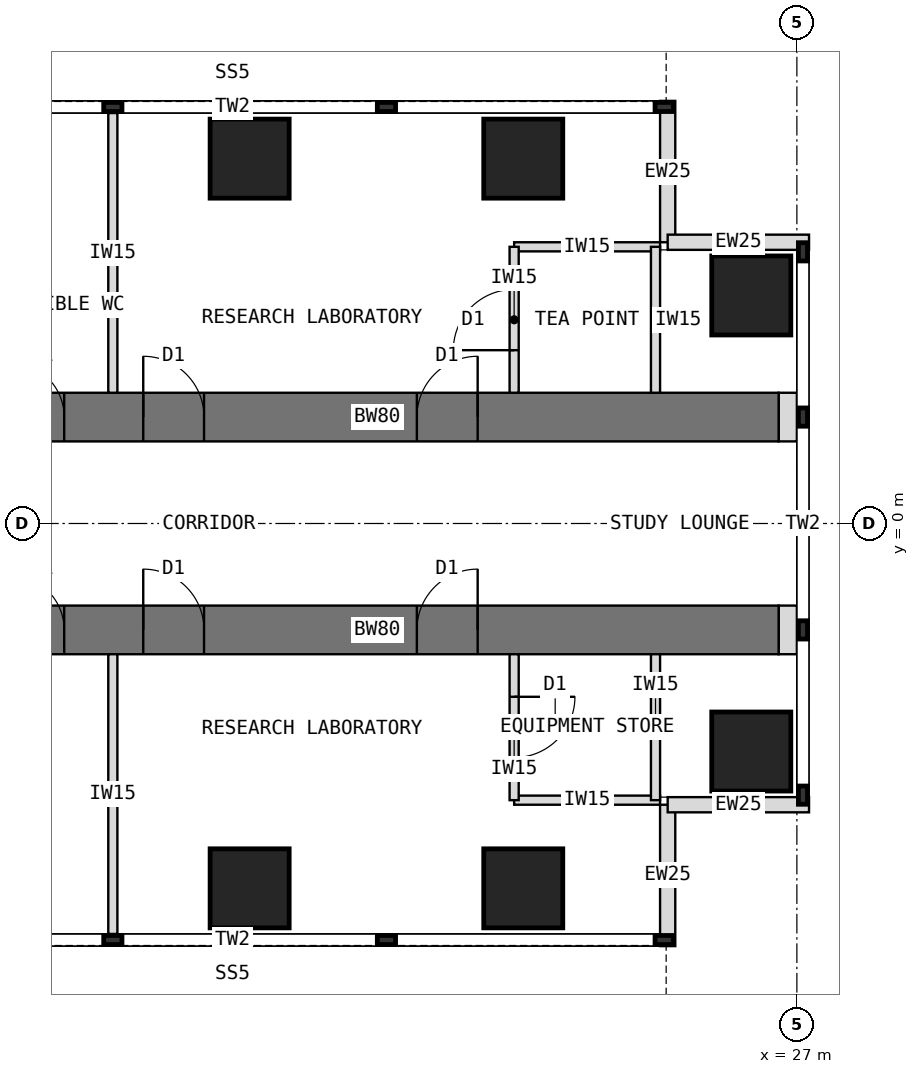
"""IFC4 building model, lengths in metres.
Left out: names, types, materials, properties, quantities, classifications, styles, units other than length and angle.
Written with IfcOpenShell. Run it as: python <this file> out.ifc"""

import sys

from ifc_helpers import new_model, si_unit, direction, frame, frame_2d, origin, origin_2d, place, context, subcontext, project, spatial, rectangle, extrude, element, fill, save


model = new_model("IFC4")
c1 = context("Model", 3, precision=1e-05, world=origin(), true_north=direction((0.0, 1.0)))
c2 = subcontext(c1, "Body", "Model", "MODEL_VIEW")
j1 = project(units=[si_unit("LENGTHUNIT", "METRE"), si_unit("PLANEANGLEUNIT", "RADIAN")], contexts=[c1])
p1 = place(None, origin())
s1 = spatial("IfcSite", under=j1, at=p1, CompositionType="ELEMENT")
p2 = place(p1, origin())
s2 = spatial("IfcBuilding", under=s1, at=p2, CompositionType="ELEMENT")
p3 = place(p2, frame((0.0, 0.0, 125.5)))
s3 = spatial("IfcBuildingStorey", under=s2, at=p3, CompositionType="ELEMENT", Elevation=125.5)
p4 = place(p3, frame((13.5, 1.75, 0.0), z_axis=(0.0, 0.0, 1.0), x_axis=(1.0, 0.0, 0.0)))
e1 = element("IfcWall", 1, at=p4, inside=s3, PredefinedType="SHEAR", context=c2, shape_type="SweptSolid", body=[
    extrude(rectangle(XDim=13.2, YDim=0.8, at=frame_2d((6.6, 0.0))), origin(), (0.0, 0.0, 1.0), 4.0),
])
p5 = place(p4, frame((0.55, 0.0, 0.0)))
e2 = element("IfcOpeningElement", 2, at=p5, cuts=e1, PredefinedType="OPENING", context=c2, shape_type="SweptSolid", body=[
    extrude(rectangle(XDim=0.9, YDim=2.1, at=frame_2d((0.45, 1.05))), frame((0.0, 0.41, 0.0), z_axis=(0.0, -1.0, 0.0), x_axis=(1.0, 0.0, 0.0)), (0.0, 0.0, 1.0), 0.82),
])
p6 = place(p4, frame((2.75, 0.0, 0.0)))
e3 = element("IfcOpeningElement", 3, at=p6, cuts=e1, PredefinedType="OPENING", context=c2, shape_type="SweptSolid", body=[
    extrude(rectangle(XDim=1.0, YDim=2.1, at=frame_2d((0.5, 1.05))), frame((0.0, 0.41, 0.0), z_axis=(0.0, -1.0, 0.0), x_axis=(1.0, 0.0, 0.0)), (0.0, 0.0, 1.0), 0.82),
])
p7 = place(p4, frame((7.25, 0.0, 0.0)))
e4 = element("IfcOpeningElement", 4, at=p7, cuts=e1, PredefinedType="OPENING", context=c2, shape_type="SweptSolid", body=[
    extrude(rectangle(XDim=1.0, YDim=2.1, at=frame_2d((0.5, 1.05))), frame((0.0, 0.41, 0.0), z_axis=(0.0, -1.0, 0.0), x_axis=(1.0, 0.0, 0.0)), (0.0, 0.0, 1.0), 0.82),
])
p8 = place(p3, frame((13.5, -1.75, 0.0), z_axis=(0.0, 0.0, 1.0), x_axis=(1.0, 0.0, 0.0)))
e5 = element("IfcWall", 5, at=p8, inside=s3, PredefinedType="SHEAR", context=c2, shape_type="SweptSolid", body=[
    extrude(rectangle(XDim=13.2, YDim=0.8, at=frame_2d((6.6, 0.0))), origin(), (0.0, 0.0, 1.0), 4.0),
])
p9 = place(p8, frame((0.55, 0.0, 0.0)))
e6 = element("IfcOpeningElement", 6, at=p9, cuts=e5, PredefinedType="OPENING", context=c2, shape_type="SweptSolid", body=[
    extrude(rectangle(XDim=0.9, YDim=2.1, at=frame_2d((0.45, 1.05))), frame((0.0, 0.41, 0.0), z_axis=(0.0, -1.0, 0.0), x_axis=(1.0, 0.0, 0.0)), (0.0, 0.0, 1.0), 0.82),
])
p10 = place(p8, frame((2.75, 0.0, 0.0)))
e7 = element("IfcOpeningElement", 7, at=p10, cuts=e5, PredefinedType="OPENING", context=c2, shape_type="SweptSolid", body=[
    extrude(rectangle(XDim=1.0, YDim=2.1, at=frame_2d((0.5, 1.05))), frame((0.0, 0.41, 0.0), z_axis=(0.0, -1.0, 0.0), x_axis=(1.0, 0.0, 0.0)), (0.0, 0.0, 1.0), 0.82),
])
p11 = place(p8, frame((7.25, 0.0, 0.0)))
e8 = element("IfcOpeningElement", 8, at=p11, cuts=e5, PredefinedType="OPENING", context=c2, shape_type="SweptSolid", body=[
    extrude(rectangle(XDim=1.0, YDim=2.1, at=frame_2d((0.5, 1.05))), frame((0.0, 0.41, 0.0), z_axis=(0.0, -1.0, 0.0), x_axis=(1.0, 0.0, 0.0)), (0.0, 0.0, 1.0), 0.82),
])
for number, where, z_axis, x_axis in (
    (9, (18.0, 6.0, 0.0), (0.0, 0.0, 1.0), (1.0, 0.0, 0.0)),
    (10, (18.0, -6.0, 0.0), (0.0, 0.0, 1.0), (1.0, 0.0, 0.0)),
    (11, (22.5, 6.0, 0.0), (0.0, 0.0, 1.0), (1.0, 0.0, 0.0)),
    (12, (22.5, -6.0, 0.0), (0.0, 0.0, 1.0), (1.0, 0.0, 0.0)),
    (13, (26.25, 3.75, 0.0), (0.0, 0.0, 1.0), (1.0, 0.0, 0.0)),
    (14, (26.25, -3.75, 0.0), (0.0, 0.0, 1.0), (1.0, 0.0, 0.0)),
):
    element("IfcColumn", number, at=place(p3, frame(where, z_axis=z_axis, x_axis=x_axis)), inside=s3, PredefinedType="COLUMN", context=c2, shape_type="SweptSolid", body=[
        extrude(rectangle(XDim=1.3, YDim=1.3, at=origin_2d()), origin(), (0.0, 0.0, 1.0), 4.0),
    ])
for number, where, z_axis, x_axis in (
    (15, (24.875, 6.95, 0.0), (0.0, 0.0, 1.0), (0.0, -1.0, 0.0)),
    (16, (24.875, 4.625, 0.0), (0.0, 0.0, 1.0), (1.0, 0.0, 0.0)),
    (17, (24.875, -6.95, 0.0), (0.0, 0.0, 1.0), (0.0, 1.0, 0.0)),
    (18, (24.875, -4.625, 0.0), (0.0, 0.0, 1.0), (1.0, 0.0, 0.0)),
):
    element("IfcWall", number, at=place(p3, frame(where, z_axis=z_axis, x_axis=x_axis)), inside=s3, PredefinedType="STANDARD", context=c2, shape_type="SweptSolid", body=[
        extrude(rectangle(XDim=2.325, YDim=0.25, at=frame_2d((1.163, 0.0))), origin(), (0.0, 0.0, 1.0), 3.8),
    ])
for number, where, z_axis, x_axis in (
    (19, (26.7, 1.75, 0.0), (0.0, 0.0, 1.0), (1.0, 0.0, 0.0)),
    (20, (26.7, -1.75, 0.0), (0.0, 0.0, 1.0), (1.0, 0.0, 0.0)),
):
    element("IfcWall", number, at=place(p3, frame(where, z_axis=z_axis, x_axis=x_axis)), inside=s3, PredefinedType="PARTITIONING", context=c2, shape_type="SweptSolid", body=[
        extrude(rectangle(XDim=0.3, YDim=0.8, at=frame_2d((0.15, 0.0))), origin(), (0.0, 0.0, 1.0), 3.8),
    ])
p12 = place(p3, frame((15.75, 2.15, 0.0), z_axis=(0.0, 0.0, 1.0), x_axis=(0.0, 1.0, 0.0)))
e21 = element("IfcWall", 21, at=p12, inside=s3, PredefinedType="PARTITIONING", context=c2, shape_type="SweptSolid", body=[
    extrude(rectangle(XDim=4.6, YDim=0.15, at=frame_2d((2.3, 0.0))), origin(), (0.0, 0.0, 1.0), 3.8),
])
p13 = place(p3, frame((22.35, 4.55, 0.0), z_axis=(0.0, 0.0, 1.0), x_axis=(1.0, 0.0, 0.0)))
e22 = element("IfcWall", 22, at=p13, inside=s3, PredefinedType="PARTITIONING", context=c2, shape_type="SweptSolid", body=[
    extrude(rectangle(XDim=2.4, YDim=0.15, at=frame_2d((1.2, 0.0))), origin(), (0.0, 0.0, 1.0), 3.8),
])
p14 = place(p3, frame((22.35, 2.15, 0.0), z_axis=(0.0, 0.0, 1.0), x_axis=(0.0, 1.0, 0.0)))
e23 = element("IfcWall", 23, at=p14, inside=s3, PredefinedType="PARTITIONING", context=c2, shape_type="SweptSolid", body=[
    extrude(rectangle(XDim=2.4, YDim=0.15, at=frame_2d((1.2, 0.0))), origin(), (0.0, 0.0, 1.0), 3.8),
])
p15 = place(p14, frame((0.7, 0.0, 0.0)))
e24 = element("IfcOpeningElement", 24, at=p15, cuts=e23, PredefinedType="OPENING", context=c2, shape_type="SweptSolid", body=[
    extrude(rectangle(XDim=1.0, YDim=2.1, at=frame_2d((0.5, 1.05))), frame((0.0, 0.085, 0.0), z_axis=(0.0, -1.0, 0.0), x_axis=(1.0, 0.0, 0.0)), (0.0, 0.0, 1.0), 0.17),
])
p16 = place(p3, frame((24.675, 2.15, 0.0), z_axis=(0.0, 0.0, 1.0), x_axis=(0.0, 1.0, 0.0)))
e25 = element("IfcWall", 25, at=p16, inside=s3, PredefinedType="PARTITIONING", context=c2, shape_type="SweptSolid", body=[
    extrude(rectangle(XDim=2.4, YDim=0.15, at=frame_2d((1.2, 0.0))), origin(), (0.0, 0.0, 1.0), 3.8),
])
p17 = place(p3, frame((15.75, -2.15, 0.0), z_axis=(0.0, 0.0, 1.0), x_axis=(0.0, -1.0, 0.0)))
e26 = element("IfcWall", 26, at=p17, inside=s3, PredefinedType="PARTITIONING", context=c2, shape_type="SweptSolid", body=[
    extrude(rectangle(XDim=4.6, YDim=0.15, at=frame_2d((2.3, 0.0))), origin(), (0.0, 0.0, 1.0), 3.8),
])
p18 = place(p3, frame((22.35, -4.55, 0.0), z_axis=(0.0, 0.0, 1.0), x_axis=(1.0, 0.0, 0.0)))
e27 = element("IfcWall", 27, at=p18, inside=s3, PredefinedType="PARTITIONING", context=c2, shape_type="SweptSolid", body=[
    extrude(rectangle(XDim=2.4, YDim=0.15, at=frame_2d((1.2, 0.0))), origin(), (0.0, 0.0, 1.0), 3.8),
])
p19 = place(p3, frame((22.35, -2.15, 0.0), z_axis=(0.0, 0.0, 1.0), x_axis=(0.0, -1.0, 0.0)))
e28 = element("IfcWall", 28, at=p19, inside=s3, PredefinedType="PARTITIONING", context=c2, shape_type="SweptSolid", body=[
    extrude(rectangle(XDim=2.4, YDim=0.15, at=frame_2d((1.2, 0.0))), origin(), (0.0, 0.0, 1.0), 3.8),
])
p20 = place(p19, frame((0.7, 0.0, 0.0)))
e29 = element("IfcOpeningElement", 29, at=p20, cuts=e28, PredefinedType="OPENING", context=c2, shape_type="SweptSolid", body=[
    extrude(rectangle(XDim=1.0, YDim=2.1, at=frame_2d((0.5, 1.05))), frame((0.0, 0.085, 0.0), z_axis=(0.0, -1.0, 0.0), x_axis=(1.0, 0.0, 0.0)), (0.0, 0.0, 1.0), 0.17),
])
p21 = place(p3, frame((24.675, -2.15, 0.0), z_axis=(0.0, 0.0, 1.0), x_axis=(0.0, -1.0, 0.0)))
e30 = element("IfcWall", 30, at=p21, inside=s3, PredefinedType="PARTITIONING", context=c2, shape_type="SweptSolid", body=[
    extrude(rectangle(XDim=2.4, YDim=0.15, at=frame_2d((1.2, 0.0))), origin(), (0.0, 0.0, 1.0), 3.8),
])
p22 = place(p15, origin())
e31 = element("IfcDoor", 31, at=p22, inside=s3, OperationType="SINGLE_SWING_LEFT", PredefinedType="DOOR", context=c2, shape_type="SweptSolid", body=[
    extrude(rectangle(XDim=1.0, YDim=2.1, at=frame_2d((0.5, 1.05))), frame((0.0, 0.025, 0.0), z_axis=(0.0, -1.0, 0.0), x_axis=(1.0, 0.0, 0.0)), (0.0, 0.0, 1.0), 0.05),
])
fill(e24, e31)
p23 = place(p20, origin())
e32 = element("IfcDoor", 32, at=p23, inside=s3, OperationType="SINGLE_SWING_LEFT", PredefinedType="DOOR", context=c2, shape_type="SweptSolid", body=[
    extrude(rectangle(XDim=1.0, YDim=2.1, at=frame_2d((0.5, 1.05))), frame((0.0, 0.025, 0.0), z_axis=(0.0, -1.0, 0.0), x_axis=(1.0, 0.0, 0.0)), (0.0, 0.0, 1.0), 0.05),
])
fill(e29, e32)
p24 = place(p5, origin())
e33 = element("IfcDoor", 33, at=p24, inside=s3, OperationType="SINGLE_SWING_LEFT", PredefinedType="DOOR", context=c2, shape_type="SweptSolid", body=[
    extrude(rectangle(XDim=0.82, YDim=2.06, at=frame_2d((0.45, 1.03))), frame((0.0, 0.025, 0.0), z_axis=(0.0, -1.0, 0.0), x_axis=(1.0, 0.0, 0.0)), (0.0, 0.0, 1.0), 0.05),
    extrude(rectangle(XDim=0.04, YDim=2.1, at=frame_2d((0.02, 1.05))), frame((0.0, 0.4, 0.0), z_axis=(0.0, -1.0, 0.0), x_axis=(1.0, 0.0, 0.0)), (0.0, 0.0, 1.0), 0.8),
    extrude(rectangle(XDim=0.04, YDim=2.1, at=frame_2d((0.88, 1.05))), frame((0.0, 0.4, 0.0), z_axis=(0.0, -1.0, 0.0), x_axis=(1.0, 0.0, 0.0)), (0.0, 0.0, 1.0), 0.8),
    extrude(rectangle(XDim=0.82, YDim=0.04, at=frame_2d((0.45, 2.08))), frame((0.0, 0.4, 0.0), z_axis=(0.0, -1.0, 0.0), x_axis=(1.0, 0.0, 0.0)), (0.0, 0.0, 1.0), 0.8),
])
fill(e2, e33)
p25 = place(p6, origin())
e34 = element("IfcDoor", 34, at=p25, inside=s3, OperationType="SINGLE_SWING_LEFT", PredefinedType="DOOR", context=c2, shape_type="SweptSolid", body=[
    extrude(rectangle(XDim=0.92, YDim=2.06, at=frame_2d((0.5, 1.03))), frame((0.0, 0.025, 0.0), z_axis=(0.0, -1.0, 0.0), x_axis=(1.0, 0.0, 0.0)), (0.0, 0.0, 1.0), 0.05),
    extrude(rectangle(XDim=0.04, YDim=2.1, at=frame_2d((0.02, 1.05))), frame((0.0, 0.4, 0.0), z_axis=(0.0, -1.0, 0.0), x_axis=(1.0, 0.0, 0.0)), (0.0, 0.0, 1.0), 0.8),
    extrude(rectangle(XDim=0.04, YDim=2.1, at=frame_2d((0.98, 1.05))), frame((0.0, 0.4, 0.0), z_axis=(0.0, -1.0, 0.0), x_axis=(1.0, 0.0, 0.0)), (0.0, 0.0, 1.0), 0.8),
    extrude(rectangle(XDim=0.92, YDim=0.04, at=frame_2d((0.5, 2.08))), frame((0.0, 0.4, 0.0), z_axis=(0.0, -1.0, 0.0), x_axis=(1.0, 0.0, 0.0)), (0.0, 0.0, 1.0), 0.8),
])
fill(e3, e34)
p26 = place(p7, origin())
e35 = element("IfcDoor", 35, at=p26, inside=s3, OperationType="SINGLE_SWING_RIGHT", PredefinedType="DOOR", context=c2, shape_type="SweptSolid", body=[
    extrude(rectangle(XDim=0.92, YDim=2.06, at=frame_2d((0.5, 1.03))), frame((0.0, 0.025, 0.0), z_axis=(0.0, -1.0, 0.0), x_axis=(1.0, 0.0, 0.0)), (0.0, 0.0, 1.0), 0.05),
    extrude(rectangle(XDim=0.04, YDim=2.1, at=frame_2d((0.02, 1.05))), frame((0.0, 0.4, 0.0), z_axis=(0.0, -1.0, 0.0), x_axis=(1.0, 0.0, 0.0)), (0.0, 0.0, 1.0), 0.8),
    extrude(rectangle(XDim=0.04, YDim=2.1, at=frame_2d((0.98, 1.05))), frame((0.0, 0.4, 0.0), z_axis=(0.0, -1.0, 0.0), x_axis=(1.0, 0.0, 0.0)), (0.0, 0.0, 1.0), 0.8),
    extrude(rectangle(XDim=0.92, YDim=0.04, at=frame_2d((0.5, 2.08))), frame((0.0, 0.4, 0.0), z_axis=(0.0, -1.0, 0.0), x_axis=(1.0, 0.0, 0.0)), (0.0, 0.0, 1.0), 0.8),
])
fill(e4, e35)
p27 = place(p9, origin())
e36 = element("IfcDoor", 36, at=p27, inside=s3, OperationType="SINGLE_SWING_LEFT", PredefinedType="DOOR", context=c2, shape_type="SweptSolid", body=[
    extrude(rectangle(XDim=0.82, YDim=2.06, at=frame_2d((0.45, 1.03))), frame((0.0, 0.025, 0.0), z_axis=(0.0, -1.0, 0.0), x_axis=(1.0, 0.0, 0.0)), (0.0, 0.0, 1.0), 0.05),
    extrude(rectangle(XDim=0.04, YDim=2.1, at=frame_2d((0.02, 1.05))), frame((0.0, 0.4, 0.0), z_axis=(0.0, -1.0, 0.0), x_axis=(1.0, 0.0, 0.0)), (0.0, 0.0, 1.0), 0.8),
    extrude(rectangle(XDim=0.04, YDim=2.1, at=frame_2d((0.88, 1.05))), frame((0.0, 0.4, 0.0), z_axis=(0.0, -1.0, 0.0), x_axis=(1.0, 0.0, 0.0)), (0.0, 0.0, 1.0), 0.8),
    extrude(rectangle(XDim=0.82, YDim=0.04, at=frame_2d((0.45, 2.08))), frame((0.0, 0.4, 0.0), z_axis=(0.0, -1.0, 0.0), x_axis=(1.0, 0.0, 0.0)), (0.0, 0.0, 1.0), 0.8),
])
fill(e6, e36)
p28 = place(p10, origin())
e37 = element("IfcDoor", 37, at=p28, inside=s3, OperationType="SINGLE_SWING_LEFT", PredefinedType="DOOR", context=c2, shape_type="SweptSolid", body=[
    extrude(rectangle(XDim=0.92, YDim=2.06, at=frame_2d((0.5, 1.03))), frame((0.0, 0.025, 0.0), z_axis=(0.0, -1.0, 0.0), x_axis=(1.0, 0.0, 0.0)), (0.0, 0.0, 1.0), 0.05),
    extrude(rectangle(XDim=0.04, YDim=2.1, at=frame_2d((0.02, 1.05))), frame((0.0, 0.4, 0.0), z_axis=(0.0, -1.0, 0.0), x_axis=(1.0, 0.0, 0.0)), (0.0, 0.0, 1.0), 0.8),
    extrude(rectangle(XDim=0.04, YDim=2.1, at=frame_2d((0.98, 1.05))), frame((0.0, 0.4, 0.0), z_axis=(0.0, -1.0, 0.0), x_axis=(1.0, 0.0, 0.0)), (0.0, 0.0, 1.0), 0.8),
    extrude(rectangle(XDim=0.92, YDim=0.04, at=frame_2d((0.5, 2.08))), frame((0.0, 0.4, 0.0), z_axis=(0.0, -1.0, 0.0), x_axis=(1.0, 0.0, 0.0)), (0.0, 0.0, 1.0), 0.8),
])
fill(e7, e37)
p29 = place(p11, origin())
e38 = element("IfcDoor", 38, at=p29, inside=s3, OperationType="SINGLE_SWING_RIGHT", PredefinedType="DOOR", context=c2, shape_type="SweptSolid", body=[
    extrude(rectangle(XDim=0.92, YDim=2.06, at=frame_2d((0.5, 1.03))), frame((0.0, 0.025, 0.0), z_axis=(0.0, -1.0, 0.0), x_axis=(1.0, 0.0, 0.0)), (0.0, 0.0, 1.0), 0.05),
    extrude(rectangle(XDim=0.04, YDim=2.1, at=frame_2d((0.02, 1.05))), frame((0.0, 0.4, 0.0), z_axis=(0.0, -1.0, 0.0), x_axis=(1.0, 0.0, 0.0)), (0.0, 0.0, 1.0), 0.8),
    extrude(rectangle(XDim=0.04, YDim=2.1, at=frame_2d((0.98, 1.05))), frame((0.0, 0.4, 0.0), z_axis=(0.0, -1.0, 0.0), x_axis=(1.0, 0.0, 0.0)), (0.0, 0.0, 1.0), 0.8),
    extrude(rectangle(XDim=0.92, YDim=0.04, at=frame_2d((0.5, 2.08))), frame((0.0, 0.4, 0.0), z_axis=(0.0, -1.0, 0.0), x_axis=(1.0, 0.0, 0.0)), (0.0, 0.0, 1.0), 0.8),
])
fill(e8, e38)
save(model, sys.argv[1])
